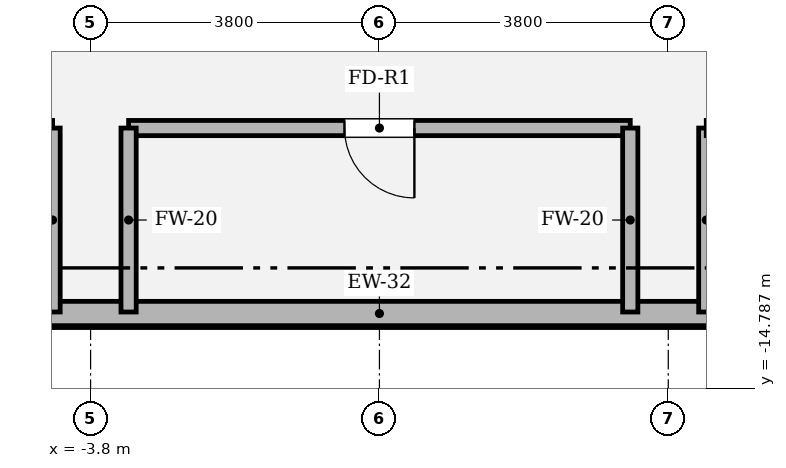
"""IFC4 building model, lengths in metres.
Left out: names, types, materials, properties, quantities, classifications, styles, units other than length and angle.
Written with IfcOpenShell. Run it as: python <this file> out.ifc"""

import sys

from ifc_helpers import new_model, si_unit, direction, frame, frame_2d, origin, place, context, subcontext, project, spatial, rectangle, extrude, element, fill, save


model = new_model("IFC4")
c1 = context("Model", 3, precision=1e-05, world=origin(), true_north=direction((0.0, 1.0)))
c2 = subcontext(c1, "Body", "Model", "MODEL_VIEW")
j1 = project(units=[si_unit("LENGTHUNIT", "METRE"), si_unit("PLANEANGLEUNIT", "RADIAN")], contexts=[c1])
p1 = place(None, origin())
s1 = spatial("IfcSite", under=j1, at=p1, CompositionType="ELEMENT")
p2 = place(p1, origin())
s2 = spatial("IfcBuilding", under=s1, at=p2, CompositionType="ELEMENT")
p3 = place(p2, frame((0.0, 0.0, 241.8)))
s3 = spatial("IfcBuildingStorey", under=s2, at=p3, CompositionType="ELEMENT", Elevation=241.8)
p4 = place(p3, frame((-12.387, -13.8, 0.0), z_axis=(0.0, 0.0, 1.0), x_axis=(1.0, 0.0, 0.0)))
e1 = element("IfcWall", 1, at=p4, inside=s3, PredefinedType="SOLIDWALL", context=c2, shape_type="SweptSolid", body=[
    extrude(rectangle(XDim=24.774, YDim=0.32, at=frame_2d((12.387, 0.0))), origin(), (0.0, 0.0, 1.0), 3.884),
])
p5 = place(p4, frame((2.2, 0.0, 0.9)))
e2 = element("IfcOpeningElement", 2, at=p5, cuts=e1, PredefinedType="OPENING", context=c2, shape_type="SweptSolid", body=[
    extrude(rectangle(XDim=2.2, YDim=1.2, at=frame_2d((1.1, 0.6))), frame((0.0, 0.17, 0.0), z_axis=(0.0, -1.0, 0.0), x_axis=(1.0, 0.0, 0.0)), (0.0, 0.0, 1.0), 0.34),
])
p6 = place(p4, frame((20.374, 0.0, 0.9)))
e3 = element("IfcOpeningElement", 3, at=p6, cuts=e1, PredefinedType="OPENING", context=c2, shape_type="SweptSolid", body=[
    extrude(rectangle(XDim=2.2, YDim=1.2, at=frame_2d((1.1, 0.6))), frame((0.0, 0.17, 0.0), z_axis=(0.0, -1.0, 0.0), x_axis=(1.0, 0.0, 0.0)), (0.0, 0.0, 1.0), 0.34),
])
p7 = place(p3, frame((-4.3, -11.36, 0.0), z_axis=(0.0, 0.0, 1.0), x_axis=(0.0, -1.0, 0.0)))
e4 = element("IfcWall", 4, at=p7, inside=s3, PredefinedType="SOLIDWALL", context=c2, shape_type="SweptSolid", body=[
    extrude(rectangle(XDim=2.42, YDim=0.2, at=frame_2d((1.21, 0.0))), origin(), (0.0, 0.0, 1.0), 4.034),
])
p8 = place(p3, frame((-3.3, -11.36, 0.0), z_axis=(0.0, 0.0, 1.0), x_axis=(1.0, 0.0, 0.0)))
e5 = element("IfcWall", 5, at=p8, inside=s3, PredefinedType="SOLIDWALL", context=c2, shape_type="SweptSolid", body=[
    extrude(rectangle(XDim=6.6, YDim=0.2, at=frame_2d((3.3, 0.0))), origin(), (0.0, 0.0, 1.0), 4.54),
])
p9 = place(p8, frame((2.84, 0.0, 0.0)))
e6 = element("IfcOpeningElement", 6, at=p9, cuts=e5, PredefinedType="OPENING", context=c2, shape_type="SweptSolid", body=[
    extrude(rectangle(XDim=0.92, YDim=2.1, at=frame_2d((0.46, 1.05))), frame((0.0, 0.11, 0.0), z_axis=(0.0, -1.0, 0.0), x_axis=(1.0, 0.0, 0.0)), (0.0, 0.0, 1.0), 0.22),
])
for number, where, z_axis, x_axis in (
    (7, (3.3, -11.36, 0.0), (0.0, 0.0, 1.0), (0.0, -1.0, 0.0)),
    (8, (-3.3, -13.78, 0.0), (0.0, 0.0, 1.0), (0.0, 1.0, 0.0)),
    (9, (4.3, -13.78, 0.0), (0.0, 0.0, 1.0), (0.0, 1.0, 0.0)),
):
    element("IfcWall", number, at=place(p3, frame(where, z_axis=z_axis, x_axis=x_axis)), inside=s3, PredefinedType="SOLIDWALL", context=c2, shape_type="SweptSolid", body=[
        extrude(rectangle(XDim=2.42, YDim=0.2, at=frame_2d((1.21, 0.0))), origin(), (0.0, 0.0, 1.0), 4.034),
    ])
p10 = place(p9, origin())
e10 = element("IfcDoor", 10, at=p10, inside=s3, OperationType="SINGLE_SWING_RIGHT", PredefinedType="DOOR", context=c2, shape_type="SweptSolid", body=[
    extrude(rectangle(XDim=0.92, YDim=2.1, at=frame_2d((0.46, 1.05))), frame((0.0, 0.025, 0.0), z_axis=(0.0, -1.0, 0.0), x_axis=(1.0, 0.0, 0.0)), (0.0, 0.0, 1.0), 0.05),
])
fill(e6, e10)
save(model, sys.argv[1])
